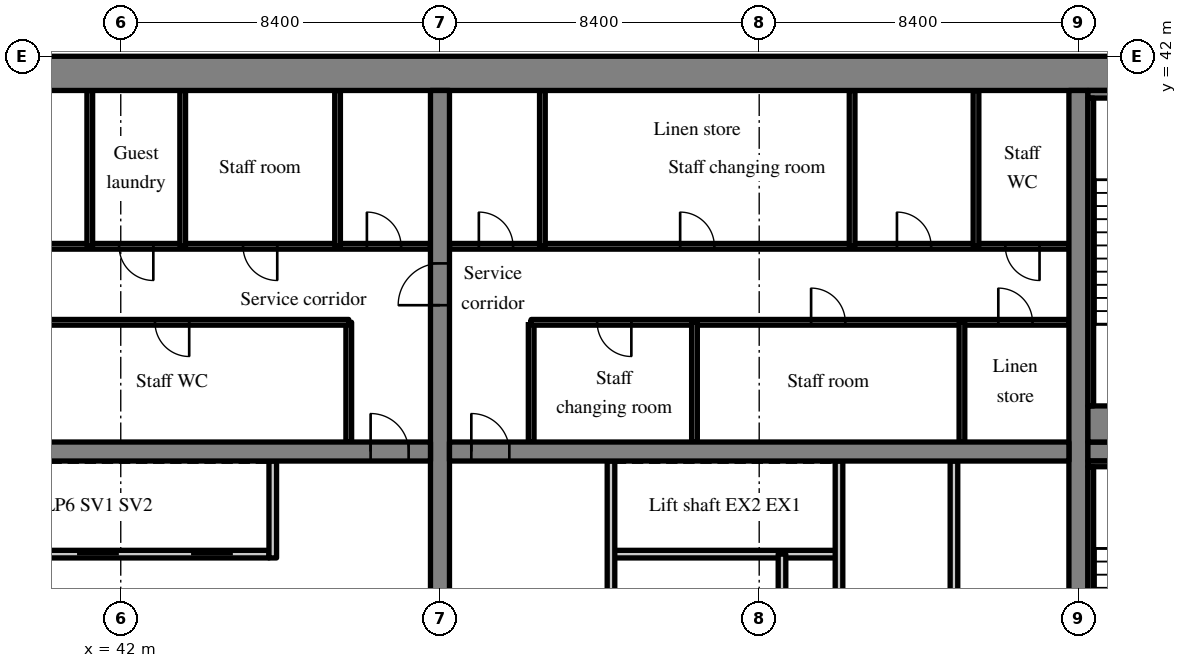
"""IFC4 building model, lengths in metres.
Left out: names, types, materials, properties, quantities, classifications, styles, units other than length and angle.
Written with IfcOpenShell. Run it as: python <this file> out.ifc"""

import sys

from ifc_helpers import new_model, si_unit, direction, frame, frame_2d, origin, place, context, subcontext, project, spatial, rectangle, extrude, source, transform, mapped, element, fill, save


model = new_model("IFC4")
c1 = context("Model", 3, precision=1e-05, world=origin(), true_north=direction((0.0, 1.0)))
c2 = subcontext(c1, "Body", "Model", "MODEL_VIEW")
j1 = project(units=[si_unit("LENGTHUNIT", "METRE"), si_unit("PLANEANGLEUNIT", "RADIAN")], contexts=[c1])
p1 = place(None, origin())
s1 = spatial("IfcSite", under=j1, at=p1, CompositionType="ELEMENT")
p2 = place(p1, origin())
s2 = spatial("IfcBuilding", under=s1, at=p2, CompositionType="ELEMENT")
p3 = place(p2, frame((0.0, 0.0, 137.0)))
s3 = spatial("IfcBuildingStorey", under=s2, at=p3, CompositionType="ELEMENT", Elevation=137.0)
m1 = source(origin(), c2, "Body", "SweptSolid", [
    extrude(rectangle(XDim=50.4, YDim=0.9, at=frame_2d((25.2, 0.0))), origin(), (0.0, 0.0, 1.0), 3.52),
])
p4 = place(p3, frame((25.2, 41.55, 0.0), z_axis=(0.0, 0.0, 1.0), x_axis=(1.0, 0.0, 0.0)))
e1 = element("IfcWall", 1, at=p4, inside=s3, PredefinedType="SHEAR", context=c2, shape_type="MappedRepresentation", body=[
    mapped(m1, transform((0.0, 0.0, 0.0), scale=1.0)),
])
m2 = source(origin(), c2, "Body", "SweptSolid", [
    extrude(rectangle(XDim=18.2, YDim=0.5, at=frame_2d((9.1, 0.0))), origin(), (0.0, 0.0, 1.0), 3.52),
])
p5 = place(p3, frame((50.4, 22.9, 0.0), z_axis=(0.0, 0.0, 1.0), x_axis=(0.0, 1.0, 0.0)))
e2 = element("IfcWall", 2, at=p5, inside=s3, PredefinedType="SHEAR", context=c2, shape_type="MappedRepresentation", body=[
    mapped(m2, transform((0.0, 0.0, 0.0), scale=1.0)),
])
m3 = source(origin(), c2, "Body", "SweptSolid", [
    extrude(rectangle(XDim=1.1, YDim=2.1, at=frame_2d((0.55, 1.05))), frame((0.0, 0.26, 0.0), z_axis=(0.0, -1.0, 0.0), x_axis=(1.0, 0.0, 0.0)), (0.0, 0.0, 1.0), 0.52),
])
p6 = place(p5, frame((12.55, 0.0, 0.0)))
e3 = element("IfcOpeningElement", 3, at=p6, cuts=e2, PredefinedType="OPENING", context=c2, shape_type="MappedRepresentation", body=[
    mapped(m3, transform((0.0, 0.0, 0.0), scale=1.0)),
])
p7 = place(p3, frame((67.2, 22.9, 0.0), z_axis=(0.0, 0.0, 1.0), x_axis=(0.0, 1.0, 0.0)))
e4 = element("IfcWall", 4, at=p7, inside=s3, PredefinedType="SHEAR", context=c2, shape_type="MappedRepresentation", body=[
    mapped(m2, transform((0.0, 0.0, 0.0), scale=1.0)),
])
m4 = source(origin(), c2, "Body", "SweptSolid", [
    extrude(rectangle(XDim=16.3, YDim=0.5, at=frame_2d((8.15, 0.0))), origin(), (0.0, 0.0, 1.0), 3.52),
])
p8 = place(p3, frame((33.85, 31.6, 0.0), z_axis=(0.0, 0.0, 1.0), x_axis=(1.0, 0.0, 0.0)))
e5 = element("IfcWall", 5, at=p8, inside=s3, PredefinedType="SHEAR", context=c2, shape_type="MappedRepresentation", body=[
    mapped(m4, transform((0.0, 0.0, 0.0), scale=1.0)),
])
m5 = source(origin(), c2, "Body", "SweptSolid", [
    extrude(rectangle(XDim=1.0, YDim=2.1, at=frame_2d((0.5, 1.05))), frame((0.0, 0.26, 0.0), z_axis=(0.0, -1.0, 0.0), x_axis=(1.0, 0.0, 0.0)), (0.0, 0.0, 1.0), 0.52),
])
p9 = place(p8, frame((14.725, 0.0, 0.0)))
e6 = element("IfcOpeningElement", 6, at=p9, cuts=e5, PredefinedType="OPENING", context=c2, shape_type="MappedRepresentation", body=[
    mapped(m5, transform((0.0, 0.0, 0.0), scale=1.0)),
])
m6 = source(origin(), c2, "Body", "SweptSolid", [
    extrude(rectangle(XDim=16.3, YDim=0.5, at=frame_2d((8.15, 0.0))), origin(), (0.0, 0.0, 1.0), 3.52),
])
p10 = place(p3, frame((50.65, 31.6, 0.0), z_axis=(0.0, 0.0, 1.0), x_axis=(1.0, 0.0, 0.0)))
e7 = element("IfcWall", 7, at=p10, inside=s3, PredefinedType="SHEAR", context=c2, shape_type="MappedRepresentation", body=[
    mapped(m6, transform((0.0, 0.0, 0.0), scale=1.0)),
])
p11 = place(p10, frame((0.575, 0.0, 0.0)))
e8 = element("IfcOpeningElement", 8, at=p11, cuts=e7, PredefinedType="OPENING", context=c2, shape_type="MappedRepresentation", body=[
    mapped(m5, transform((0.0, 0.0, 0.0), scale=1.0)),
])
m7 = source(origin(), c2, "Body", "SweptSolid", [
    extrude(rectangle(XDim=7.25, YDim=0.5, at=frame_2d((3.625, 0.0))), origin(), (0.0, 0.0, 1.0), 3.52),
])
p12 = place(p3, frame((67.45, 31.6, 0.0), z_axis=(0.0, 0.0, 1.0), x_axis=(1.0, 0.0, 0.0)))
e9 = element("IfcWall", 9, at=p12, inside=s3, PredefinedType="SHEAR", context=c2, shape_type="MappedRepresentation", body=[
    mapped(m7, transform((0.0, 0.0, 0.0), scale=1.0)),
])
p13 = place(p12, frame((5.575, 0.0, 0.0)))
e10 = element("IfcOpeningElement", 10, at=p13, cuts=e9, PredefinedType="OPENING", context=c2, shape_type="MappedRepresentation", body=[
    mapped(m3, transform((0.0, 0.0, 0.0), scale=1.0)),
])
m8 = source(origin(), c2, "Body", "SweptSolid", [
    extrude(rectangle(XDim=12.05, YDim=0.2, at=frame_2d((6.025, 0.0))), origin(), (0.0, 0.0, 1.0), 3.52),
])
p14 = place(p3, frame((33.85, 28.9, 0.0), z_axis=(0.0, 0.0, 1.0), x_axis=(1.0, 0.0, 0.0)))
e11 = element("IfcWall", 11, at=p14, inside=s3, PredefinedType="SOLIDWALL", context=c2, shape_type="MappedRepresentation", body=[
    mapped(m8, transform((0.0, 0.0, 0.0), scale=1.0)),
])
m9 = source(origin(), c2, "Body", "SweptSolid", [
    extrude(rectangle(XDim=1.1, YDim=2.1, at=frame_2d((0.55, 1.05))), frame((0.0, 0.11, 0.0), z_axis=(0.0, -1.0, 0.0), x_axis=(1.0, 0.0, 0.0)), (0.0, 0.0, 1.0), 0.22),
])
p15 = place(p14, frame((1.0, 0.0, 0.0)))
e12 = element("IfcOpeningElement", 12, at=p15, cuts=e11, PredefinedType="OPENING", context=c2, shape_type="MappedRepresentation", body=[
    mapped(m9, transform((0.0, 0.0, 0.0), scale=1.0)),
])
p16 = place(p14, frame((4.0, 0.0, 0.0)))
e13 = element("IfcOpeningElement", 13, at=p16, cuts=e11, PredefinedType="OPENING", context=c2, shape_type="MappedRepresentation", body=[
    mapped(m9, transform((0.0, 0.0, 0.0), scale=1.0)),
])
p17 = place(p14, frame((7.0, 0.0, 0.0)))
e14 = element("IfcOpeningElement", 14, at=p17, cuts=e11, PredefinedType="OPENING", context=c2, shape_type="MappedRepresentation", body=[
    mapped(m9, transform((0.0, 0.0, 0.0), scale=1.0)),
])
p18 = place(p14, frame((10.0, 0.0, 0.0)))
e15 = element("IfcOpeningElement", 15, at=p18, cuts=e11, PredefinedType="OPENING", context=c2, shape_type="MappedRepresentation", body=[
    mapped(m9, transform((0.0, 0.0, 0.0), scale=1.0)),
])
m10 = source(origin(), c2, "Body", "SweptSolid", [
    extrude(rectangle(XDim=2.55, YDim=0.2, at=frame_2d((1.275, 0.0))), origin(), (0.0, 0.0, 1.0), 3.52),
])
p19 = place(p3, frame((46.0, 28.8, 0.0), z_axis=(0.0, 0.0, 1.0), x_axis=(0.0, 1.0, 0.0)))
e16 = element("IfcWall", 16, at=p19, inside=s3, PredefinedType="SOLIDWALL", context=c2, shape_type="MappedRepresentation", body=[
    mapped(m10, transform((0.0, 0.0, 0.0), scale=1.0)),
])
m11 = source(origin(), c2, "Body", "SweptSolid", [
    extrude(rectangle(XDim=3.15, YDim=0.15, at=frame_2d((1.575, 0.0))), origin(), (0.0, 0.0, 1.0), 3.52),
])
p20 = place(p3, frame((48.0, 31.85, 0.0), z_axis=(0.0, 0.0, 1.0), x_axis=(0.0, 1.0, 0.0)))
e17 = element("IfcWall", 17, at=p20, inside=s3, PredefinedType="PARTITIONING", context=c2, shape_type="MappedRepresentation", body=[
    mapped(m11, transform((0.0, 0.0, 0.0), scale=1.0)),
])
m12 = source(origin(), c2, "Body", "SweptSolid", [
    extrude(rectangle(XDim=14.15, YDim=0.15, at=frame_2d((7.075, 0.0))), origin(), (0.0, 0.0, 1.0), 3.52),
])
p21 = place(p3, frame((33.85, 35.0, 0.0), z_axis=(0.0, 0.0, 1.0), x_axis=(1.0, 0.0, 0.0)))
e18 = element("IfcWall", 18, at=p21, inside=s3, PredefinedType="PARTITIONING", context=c2, shape_type="MappedRepresentation", body=[
    mapped(m12, transform((0.0, 0.0, 0.0), scale=1.0)),
])
m13 = source(origin(), c2, "Body", "SweptSolid", [
    extrude(rectangle(XDim=0.9, YDim=2.1, at=frame_2d((0.45, 1.05))), frame((0.0, 0.085, 0.0), z_axis=(0.0, -1.0, 0.0), x_axis=(1.0, 0.0, 0.0)), (0.0, 0.0, 1.0), 0.17),
])
p22 = place(p21, frame((2.013, 0.0, 0.0)))
e19 = element("IfcOpeningElement", 19, at=p22, cuts=e18, PredefinedType="OPENING", context=c2, shape_type="MappedRepresentation", body=[
    mapped(m13, transform((0.0, 0.0, 0.0), scale=1.0)),
])
p23 = place(p21, frame((9.051, 0.0, 0.0)))
e20 = element("IfcOpeningElement", 20, at=p23, cuts=e18, PredefinedType="OPENING", context=c2, shape_type="MappedRepresentation", body=[
    mapped(m13, transform((0.0, 0.0, 0.0), scale=1.0)),
])
m14 = source(origin(), c2, "Body", "SweptSolid", [
    extrude(rectangle(XDim=16.3, YDim=0.15, at=frame_2d((8.15, 0.0))), origin(), (0.0, 0.0, 1.0), 3.52),
])
p24 = place(p3, frame((33.85, 37.0, 0.0), z_axis=(0.0, 0.0, 1.0), x_axis=(1.0, 0.0, 0.0)))
e21 = element("IfcWall", 21, at=p24, inside=s3, PredefinedType="PARTITIONING", context=c2, shape_type="MappedRepresentation", body=[
    mapped(m14, transform((0.0, 0.0, 0.0), scale=1.0)),
])
p25 = place(p24, frame((3.217, 0.0, 0.0)))
e22 = element("IfcOpeningElement", 22, at=p25, cuts=e21, PredefinedType="OPENING", context=c2, shape_type="MappedRepresentation", body=[
    mapped(m13, transform((0.0, 0.0, 0.0), scale=1.0)),
])
p26 = place(p24, frame((8.107, 0.0, 0.0)))
e23 = element("IfcOpeningElement", 23, at=p26, cuts=e21, PredefinedType="OPENING", context=c2, shape_type="MappedRepresentation", body=[
    mapped(m13, transform((0.0, 0.0, 0.0), scale=1.0)),
])
p27 = place(p24, frame((11.368, 0.0, 0.0)))
e24 = element("IfcOpeningElement", 24, at=p27, cuts=e21, PredefinedType="OPENING", context=c2, shape_type="MappedRepresentation", body=[
    mapped(m13, transform((0.0, 0.0, 0.0), scale=1.0)),
])
p28 = place(p24, frame((14.627, 0.0, 0.0)))
e25 = element("IfcOpeningElement", 25, at=p28, cuts=e21, PredefinedType="OPENING", context=c2, shape_type="MappedRepresentation", body=[
    mapped(m13, transform((0.0, 0.0, 0.0), scale=1.0)),
])
m15 = source(origin(), c2, "Body", "SweptSolid", [
    extrude(rectangle(XDim=4.1, YDim=0.15, at=frame_2d((2.05, 0.0))), origin(), (0.0, 0.0, 1.0), 3.52),
])
for number, where, z_axis, x_axis in (
    (26, (41.185, 37.0, 0.0), (0.0, 0.0, 1.0), (0.0, 1.0, 0.0)),
    (27, (43.63, 37.0, 0.0), (0.0, 0.0, 1.0), (0.0, 1.0, 0.0)),
    (28, (47.705, 37.0, 0.0), (0.0, 0.0, 1.0), (0.0, 1.0, 0.0)),
):
    element("IfcWall", number, at=place(p3, frame(where, z_axis=z_axis, x_axis=x_axis)), inside=s3, PredefinedType="PARTITIONING", context=c2, shape_type="MappedRepresentation", body=[
        mapped(m15, transform((0.0, 0.0, 0.0), scale=1.0)),
    ])
m16 = source(origin(), c2, "Body", "SweptSolid", [
    extrude(rectangle(XDim=6.0, YDim=0.2, at=frame_2d((3.0, 0.0))), origin(), (0.0, 0.0, 1.0), 3.52),
])
p29 = place(p3, frame((60.9, 28.9, 0.0), z_axis=(0.0, 0.0, 1.0), x_axis=(-1.0, 0.0, 0.0)))
e29 = element("IfcWall", 29, at=p29, inside=s3, PredefinedType="SOLIDWALL", context=c2, shape_type="MappedRepresentation", body=[
    mapped(m16, transform((0.0, 0.0, 0.0), scale=1.0)),
])
m17 = source(origin(), c2, "Body", "SweptSolid", [
    extrude(rectangle(XDim=8.45, YDim=0.2, at=frame_2d((4.225, 0.0))), origin(), (0.0, 0.0, 1.0), 3.52),
])
for number, where, z_axis, x_axis in (
    (30, (54.9, 22.9, 0.0), (0.0, 0.0, 1.0), (0.0, 1.0, 0.0)),
    (31, (60.9, 22.9, 0.0), (0.0, 0.0, 1.0), (0.0, 1.0, 0.0)),
):
    element("IfcWall", number, at=place(p3, frame(where, z_axis=z_axis, x_axis=x_axis)), inside=s3, PredefinedType="PARTITIONING", context=c2, shape_type="MappedRepresentation", body=[
        mapped(m17, transform((0.0, 0.0, 0.0), scale=1.0)),
    ])
p30 = place(p3, frame((59.4, 22.9, 0.0), z_axis=(0.0, 0.0, 1.0), x_axis=(0.0, 1.0, 0.0)))
e32 = element("IfcWall", 32, at=p30, inside=s3, PredefinedType="PARTITIONING", context=c2, shape_type="MappedRepresentation", body=[
    mapped(m16, transform((0.0, 0.0, 0.0), scale=1.0)),
])
p31 = place(p3, frame((63.925, 22.9, 0.0), z_axis=(0.0, 0.0, 1.0), x_axis=(0.0, 1.0, 0.0)))
e33 = element("IfcWall", 33, at=p31, inside=s3, PredefinedType="PARTITIONING", context=c2, shape_type="MappedRepresentation", body=[
    mapped(m17, transform((0.0, 0.0, 0.0), scale=1.0)),
])
p32 = place(p3, frame((52.8, 31.85, 0.0), z_axis=(0.0, 0.0, 1.0), x_axis=(0.0, 1.0, 0.0)))
e34 = element("IfcWall", 34, at=p32, inside=s3, PredefinedType="PARTITIONING", context=c2, shape_type="MappedRepresentation", body=[
    mapped(m11, transform((0.0, 0.0, 0.0), scale=1.0)),
])
p33 = place(p3, frame((66.95, 35.0, 0.0), z_axis=(0.0, 0.0, 1.0), x_axis=(-1.0, 0.0, 0.0)))
e35 = element("IfcWall", 35, at=p33, inside=s3, PredefinedType="PARTITIONING", context=c2, shape_type="MappedRepresentation", body=[
    mapped(m12, transform((0.0, 0.0, 0.0), scale=1.0)),
])
p34 = place(p33, frame((0.958, 0.0, 0.0)))
e36 = element("IfcOpeningElement", 36, at=p34, cuts=e35, PredefinedType="OPENING", context=c2, shape_type="MappedRepresentation", body=[
    mapped(m13, transform((0.0, 0.0, 0.0), scale=1.0)),
])
p35 = place(p33, frame((5.884, 0.0, 0.0)))
e37 = element("IfcOpeningElement", 37, at=p35, cuts=e35, PredefinedType="OPENING", context=c2, shape_type="MappedRepresentation", body=[
    mapped(m13, transform((0.0, 0.0, 0.0), scale=1.0)),
])
p36 = place(p33, frame((11.514, 0.0, 0.0)))
e38 = element("IfcOpeningElement", 38, at=p36, cuts=e35, PredefinedType="OPENING", context=c2, shape_type="MappedRepresentation", body=[
    mapped(m13, transform((0.0, 0.0, 0.0), scale=1.0)),
])
m18 = source(origin(), c2, "Body", "SweptSolid", [
    extrude(rectangle(XDim=16.3, YDim=0.15, at=frame_2d((8.15, 0.0))), origin(), (0.0, 0.0, 1.0), 3.52),
])
p37 = place(p3, frame((66.95, 37.0, 0.0), z_axis=(0.0, 0.0, 1.0), x_axis=(-1.0, 0.0, 0.0)))
e39 = element("IfcWall", 39, at=p37, inside=s3, PredefinedType="PARTITIONING", context=c2, shape_type="MappedRepresentation", body=[
    mapped(m18, transform((0.0, 0.0, 0.0), scale=1.0)),
])
p38 = place(p37, frame((0.773, 0.0, 0.0)))
e40 = element("IfcOpeningElement", 40, at=p38, cuts=e39, PredefinedType="OPENING", context=c2, shape_type="MappedRepresentation", body=[
    mapped(m13, transform((0.0, 0.0, 0.0), scale=1.0)),
])
p39 = place(p37, frame((3.625, 0.0, 0.0)))
e41 = element("IfcOpeningElement", 41, at=p39, cuts=e39, PredefinedType="OPENING", context=c2, shape_type="MappedRepresentation", body=[
    mapped(m13, transform((0.0, 0.0, 0.0), scale=1.0)),
])
p40 = place(p37, frame((9.33, 0.0, 0.0)))
e42 = element("IfcOpeningElement", 42, at=p40, cuts=e39, PredefinedType="OPENING", context=c2, shape_type="MappedRepresentation", body=[
    mapped(m13, transform((0.0, 0.0, 0.0), scale=1.0)),
])
p41 = place(p37, frame((14.627, 0.0, 0.0)))
e43 = element("IfcOpeningElement", 43, at=p41, cuts=e39, PredefinedType="OPENING", context=c2, shape_type="MappedRepresentation", body=[
    mapped(m13, transform((0.0, 0.0, 0.0), scale=1.0)),
])
for number, where, z_axis, x_axis in (
    (44, (64.135, 31.85, 0.0), (0.0, 0.0, 1.0), (0.0, 1.0, 0.0)),
    (45, (57.097, 31.85, 0.0), (0.0, 0.0, 1.0), (0.0, 1.0, 0.0)),
):
    element("IfcWall", number, at=place(p3, frame(where, z_axis=z_axis, x_axis=x_axis)), inside=s3, PredefinedType="PARTITIONING", context=c2, shape_type="MappedRepresentation", body=[
        mapped(m11, transform((0.0, 0.0, 0.0), scale=1.0)),
    ])
for number, where, z_axis, x_axis in (
    (46, (64.505, 37.0, 0.0), (0.0, 0.0, 1.0), (0.0, 1.0, 0.0)),
    (47, (61.245, 37.0, 0.0), (0.0, 0.0, 1.0), (0.0, 1.0, 0.0)),
    (48, (53.095, 37.0, 0.0), (0.0, 0.0, 1.0), (0.0, 1.0, 0.0)),
):
    element("IfcWall", number, at=place(p3, frame(where, z_axis=z_axis, x_axis=x_axis)), inside=s3, PredefinedType="PARTITIONING", context=c2, shape_type="MappedRepresentation", body=[
        mapped(m15, transform((0.0, 0.0, 0.0), scale=1.0)),
    ])
m19 = source(origin(), c2, "Body", "SweptSolid", [
    extrude(rectangle(XDim=4.8, YDim=0.15, at=frame_2d((2.4, 0.0))), origin(), (0.0, 0.0, 1.0), 3.52),
])
p42 = place(p3, frame((67.45, 31.275, 0.0), z_axis=(0.0, 0.0, 1.0), x_axis=(1.0, 0.0, 0.0)))
e49 = element("IfcWall", 49, at=p42, inside=s3, PredefinedType="SOLIDWALL", context=c2, shape_type="MappedRepresentation", body=[
    mapped(m19, transform((0.0, 0.0, 0.0), scale=1.0)),
])
m20 = source(origin(), c2, "Body", "SweptSolid", [
    extrude(rectangle(XDim=8.1, YDim=0.15, at=frame_2d((4.05, 0.0))), origin(), (0.0, 0.0, 1.0), 3.52),
])
p43 = place(p3, frame((67.525, 23.1, 0.0), z_axis=(0.0, 0.0, 1.0), x_axis=(0.0, 1.0, 0.0)))
e50 = element("IfcWall", 50, at=p43, inside=s3, PredefinedType="SOLIDWALL", context=c2, shape_type="MappedRepresentation", body=[
    mapped(m20, transform((0.0, 0.0, 0.0), scale=1.0)),
])
m21 = source(origin(), c2, "Body", "SweptSolid", [
    extrude(rectangle(XDim=4.8, YDim=0.2, at=frame_2d((2.4, 0.0))), origin(), (0.0, 0.0, 1.0), 3.52),
])
p44 = place(p3, frame((67.45, 41.0, 0.0), z_axis=(0.0, 0.0, 1.0), x_axis=(1.0, 0.0, 0.0)))
e51 = element("IfcWall", 51, at=p44, inside=s3, PredefinedType="SOLIDWALL", context=c2, shape_type="MappedRepresentation", body=[
    mapped(m21, transform((0.0, 0.0, 0.0), scale=1.0)),
])
m22 = source(origin(), c2, "Body", "SweptSolid", [
    extrude(rectangle(XDim=4.8, YDim=0.95, at=frame_2d((2.4, 0.0))), origin(), (0.0, 0.0, 1.0), 3.52),
])
p45 = place(p3, frame((67.45, 32.325, 0.0), z_axis=(0.0, 0.0, 1.0), x_axis=(1.0, 0.0, 0.0)))
e52 = element("IfcWall", 52, at=p45, inside=s3, PredefinedType="SOLIDWALL", context=c2, shape_type="MappedRepresentation", body=[
    mapped(m22, transform((0.0, 0.0, 0.0), scale=1.0)),
])
p46 = place(p3, frame((67.525, 32.8, 0.0), z_axis=(0.0, 0.0, 1.0), x_axis=(0.0, 1.0, 0.0)))
e53 = element("IfcWall", 53, at=p46, inside=s3, PredefinedType="SOLIDWALL", context=c2, shape_type="MappedRepresentation", body=[
    mapped(m20, transform((0.0, 0.0, 0.0), scale=1.0)),
])
m23 = source(origin(), c2, "Body", "SweptSolid", [
    extrude(rectangle(XDim=1.0, YDim=2.1, at=frame_2d((0.5, 1.05))), frame((0.0, 0.025, 0.0), z_axis=(0.0, -1.0, 0.0), x_axis=(1.0, 0.0, 0.0)), (0.0, 0.0, 1.0), 0.05),
])
p47 = place(p9, origin())
e54 = element("IfcDoor", 54, at=p47, inside=s3, OperationType="SINGLE_SWING_LEFT", PredefinedType="DOOR", context=c2, shape_type="MappedRepresentation", body=[
    mapped(m23, transform((0.0, 0.0, 0.0), scale=1.0)),
])
fill(e6, e54)
m24 = source(origin(), c2, "Body", "SweptSolid", [
    extrude(rectangle(XDim=1.1, YDim=2.1, at=frame_2d((0.55, 1.05))), frame((0.0, 0.025, 0.0), z_axis=(0.0, -1.0, 0.0), x_axis=(1.0, 0.0, 0.0)), (0.0, 0.0, 1.0), 0.05),
])
p48 = place(p17, origin())
e55 = element("IfcDoor", 55, at=p48, inside=s3, OperationType="SLIDING_TO_LEFT", PredefinedType="DOOR", context=c2, shape_type="MappedRepresentation", body=[
    mapped(m24, transform((0.0, 0.0, 0.0), scale=1.0)),
])
fill(e14, e55)
p49 = place(p18, origin())
e56 = element("IfcDoor", 56, at=p49, inside=s3, OperationType="SLIDING_TO_RIGHT", PredefinedType="DOOR", context=c2, shape_type="MappedRepresentation", body=[
    mapped(m24, transform((0.0, 0.0, 0.0), scale=1.0)),
])
fill(e15, e56)
m25 = source(origin(), c2, "Body", "SweptSolid", [
    extrude(rectangle(XDim=0.9, YDim=2.1, at=frame_2d((0.45, 1.05))), frame((0.0, 0.025, 0.0), z_axis=(0.0, -1.0, 0.0), x_axis=(1.0, 0.0, 0.0)), (0.0, 0.0, 1.0), 0.05),
])
p50 = place(p23, origin())
e57 = element("IfcDoor", 57, at=p50, inside=s3, OperationType="SINGLE_SWING_RIGHT", PredefinedType="DOOR", context=c2, shape_type="MappedRepresentation", body=[
    mapped(m25, transform((0.0, 0.0, 0.0), scale=1.0)),
])
fill(e20, e57)
p51 = place(p26, origin())
e58 = element("IfcDoor", 58, at=p51, inside=s3, OperationType="SINGLE_SWING_RIGHT", PredefinedType="DOOR", context=c2, shape_type="MappedRepresentation", body=[
    mapped(m25, transform((0.0, 0.0, 0.0), scale=1.0)),
])
fill(e23, e58)
p52 = place(p27, origin())
e59 = element("IfcDoor", 59, at=p52, inside=s3, OperationType="SINGLE_SWING_RIGHT", PredefinedType="DOOR", context=c2, shape_type="MappedRepresentation", body=[
    mapped(m25, transform((0.0, 0.0, 0.0), scale=1.0)),
])
fill(e24, e59)
p53 = place(p28, origin())
e60 = element("IfcDoor", 60, at=p53, inside=s3, OperationType="SINGLE_SWING_LEFT", PredefinedType="DOOR", context=c2, shape_type="MappedRepresentation", body=[
    mapped(m25, transform((0.0, 0.0, 0.0), scale=1.0)),
])
fill(e25, e60)
p54 = place(p11, origin())
e61 = element("IfcDoor", 61, at=p54, inside=s3, OperationType="SINGLE_SWING_LEFT", PredefinedType="DOOR", context=c2, shape_type="MappedRepresentation", body=[
    mapped(m23, transform((0.0, 0.0, 0.0), scale=1.0)),
])
fill(e8, e61)
p55 = place(p34, origin())
e62 = element("IfcDoor", 62, at=p55, inside=s3, OperationType="SINGLE_SWING_RIGHT", PredefinedType="DOOR", context=c2, shape_type="MappedRepresentation", body=[
    mapped(m25, transform((0.0, 0.0, 0.0), scale=1.0)),
])
fill(e36, e62)
p56 = place(p35, origin())
e63 = element("IfcDoor", 63, at=p56, inside=s3, OperationType="SINGLE_SWING_RIGHT", PredefinedType="DOOR", context=c2, shape_type="MappedRepresentation", body=[
    mapped(m25, transform((0.0, 0.0, 0.0), scale=1.0)),
])
fill(e37, e63)
p57 = place(p36, origin())
e64 = element("IfcDoor", 64, at=p57, inside=s3, OperationType="SINGLE_SWING_LEFT", PredefinedType="DOOR", context=c2, shape_type="MappedRepresentation", body=[
    mapped(m25, transform((0.0, 0.0, 0.0), scale=1.0)),
])
fill(e38, e64)
p58 = place(p38, origin())
e65 = element("IfcDoor", 65, at=p58, inside=s3, OperationType="SINGLE_SWING_LEFT", PredefinedType="DOOR", context=c2, shape_type="MappedRepresentation", body=[
    mapped(m25, transform((0.0, 0.0, 0.0), scale=1.0)),
])
fill(e40, e65)
p59 = place(p39, origin())
e66 = element("IfcDoor", 66, at=p59, inside=s3, OperationType="SINGLE_SWING_RIGHT", PredefinedType="DOOR", context=c2, shape_type="MappedRepresentation", body=[
    mapped(m25, transform((0.0, 0.0, 0.0), scale=1.0)),
])
fill(e41, e66)
p60 = place(p40, origin())
e67 = element("IfcDoor", 67, at=p60, inside=s3, OperationType="SINGLE_SWING_RIGHT", PredefinedType="DOOR", context=c2, shape_type="MappedRepresentation", body=[
    mapped(m25, transform((0.0, 0.0, 0.0), scale=1.0)),
])
fill(e42, e67)
p61 = place(p41, origin())
e68 = element("IfcDoor", 68, at=p61, inside=s3, OperationType="SINGLE_SWING_RIGHT", PredefinedType="DOOR", context=c2, shape_type="MappedRepresentation", body=[
    mapped(m25, transform((0.0, 0.0, 0.0), scale=1.0)),
])
fill(e43, e68)
p62 = place(p6, origin())
e69 = element("IfcDoor", 69, at=p62, inside=s3, OperationType="SINGLE_SWING_LEFT", PredefinedType="DOOR", context=c2, shape_type="MappedRepresentation", body=[
    mapped(m24, transform((0.0, 0.0, 0.0), scale=1.0)),
])
fill(e3, e69)
save(model, sys.argv[1])
